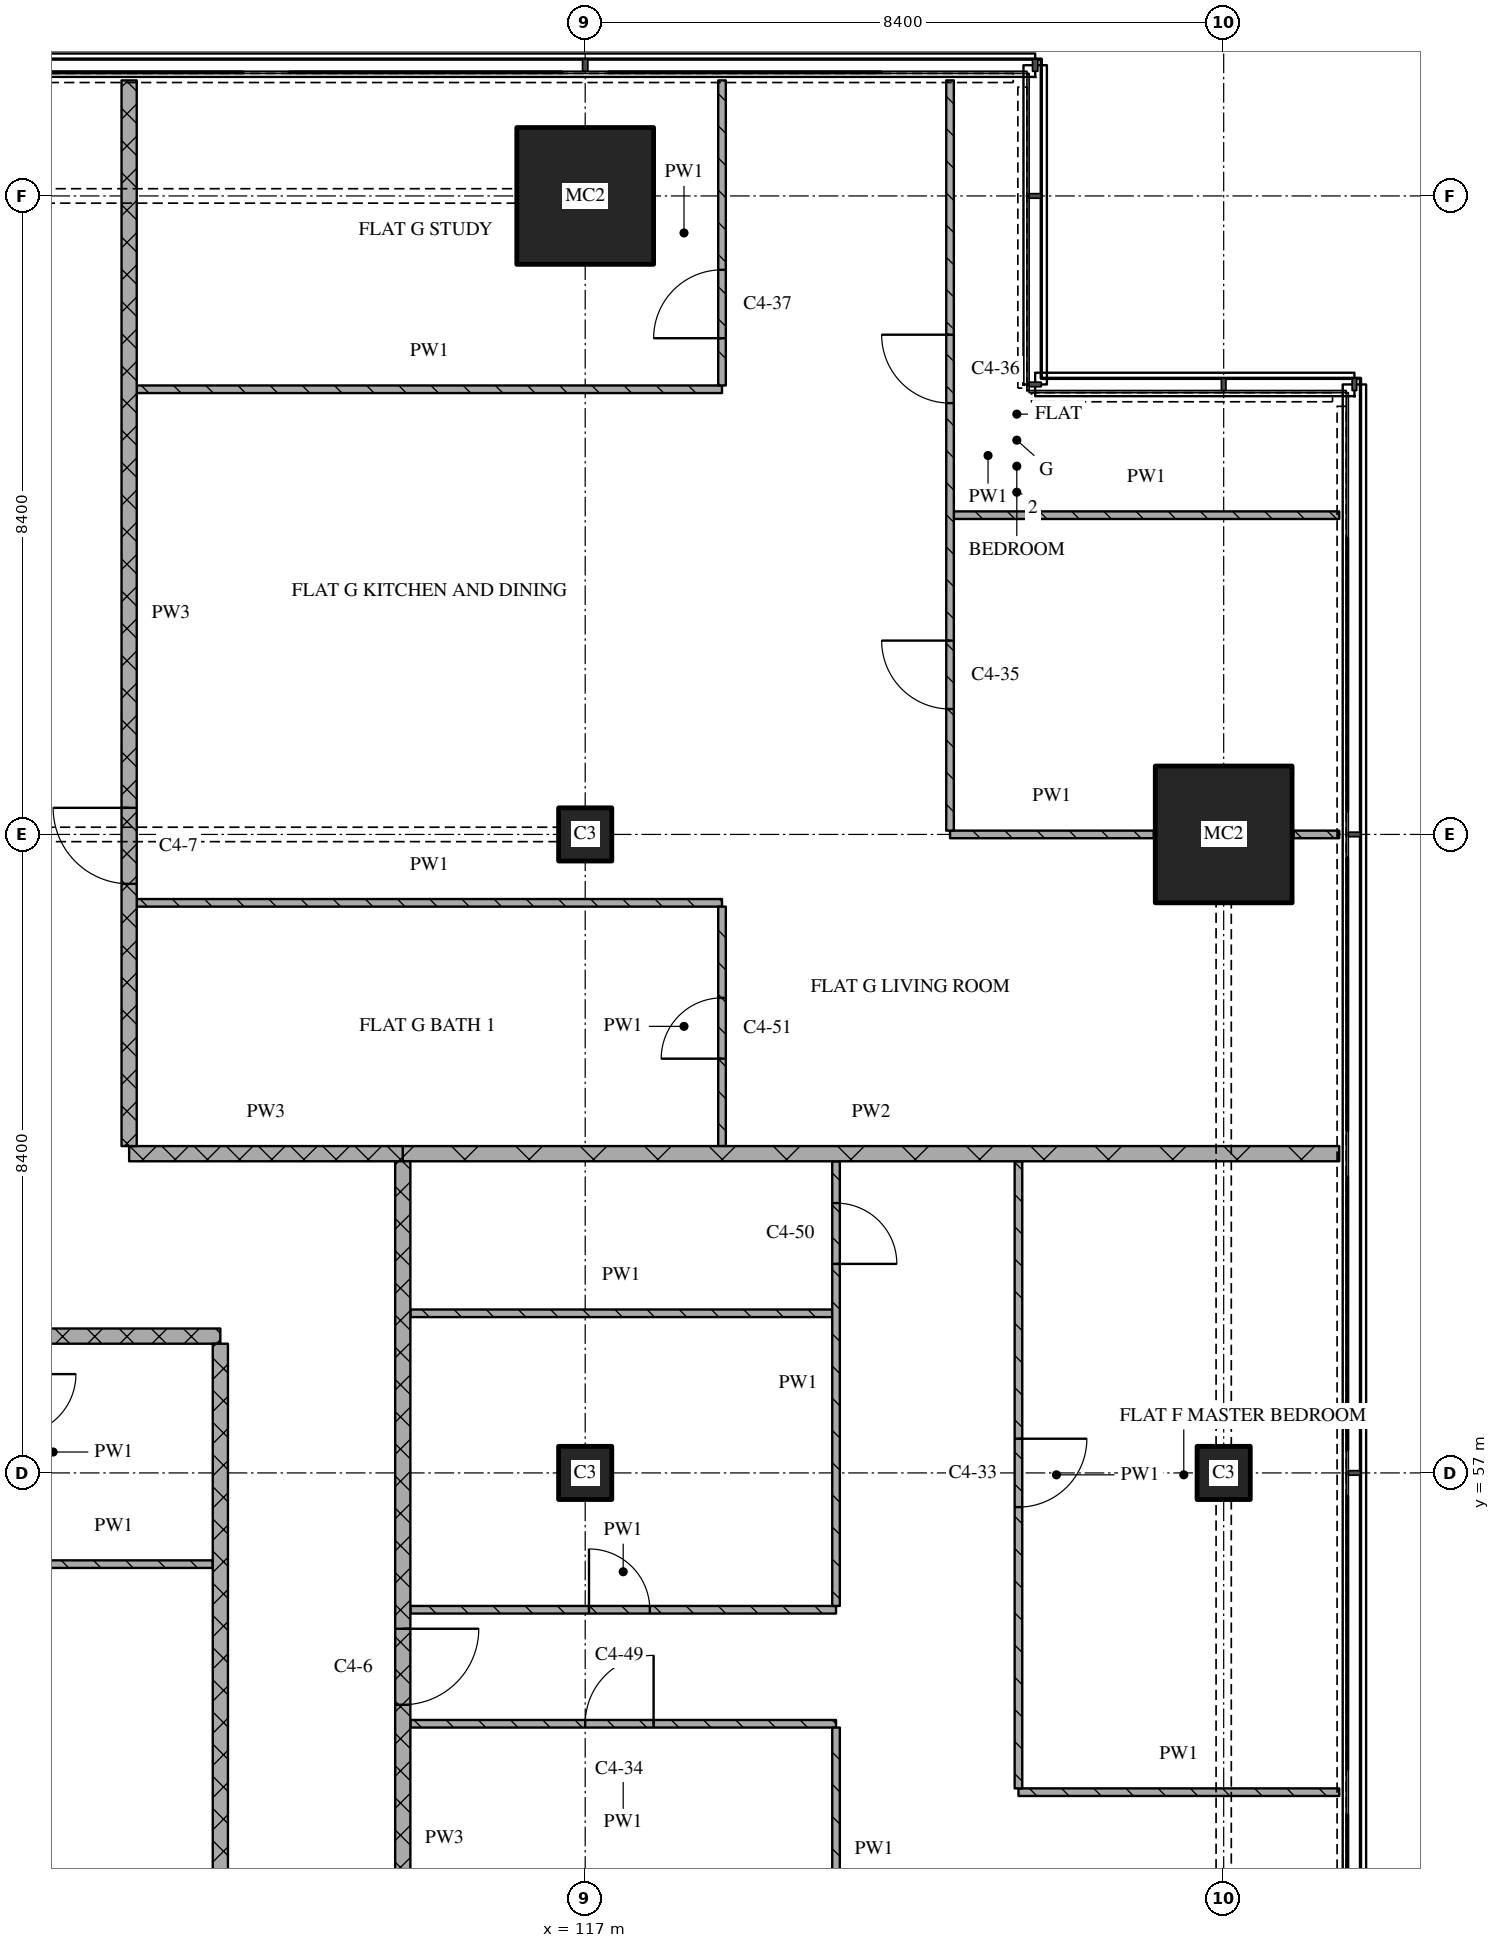
"""IFC4 building model, lengths in metres.
Left out: names, types, materials, properties, quantities, classifications, styles, units other than length and angle.
Written with IfcOpenShell. Run it as: python <this file> out.ifc"""

import sys

from ifc_helpers import new_model, si_unit, direction, frame, frame_2d, origin, origin_2d, place, context, subcontext, project, spatial, rectangle, extrude, element, fill, save


model = new_model("IFC4")
c1 = context("Model", 3, precision=1e-05, world=origin(), true_north=direction((0.0, 1.0)))
c2 = subcontext(c1, "Body", "Model", "MODEL_VIEW")
j1 = project(units=[si_unit("LENGTHUNIT", "METRE"), si_unit("PLANEANGLEUNIT", "RADIAN")], contexts=[c1])
p1 = place(None, origin())
s1 = spatial("IfcSite", under=j1, at=p1, CompositionType="ELEMENT")
p2 = place(p1, origin())
s2 = spatial("IfcBuilding", under=s1, at=p2, CompositionType="ELEMENT")
p3 = place(p2, frame((0.0, 0.0, 183.45)))
s3 = spatial("IfcBuildingStorey", under=s2, at=p3, CompositionType="ELEMENT", Elevation=183.45)
for number, where, z_axis, x_axis in (
    (1, (117.0, 57.0, 0.0), (0.0, 0.0, 1.0), (1.0, 0.0, 0.0)),
    (2, (117.0, 65.4, 0.0), (0.0, 0.0, 1.0), (1.0, 0.0, 0.0)),
):
    element("IfcColumn", number, at=place(p3, frame(where, z_axis=z_axis, x_axis=x_axis)), inside=s3, PredefinedType="COLUMN", context=c2, shape_type="SweptSolid", body=[
        extrude(rectangle(XDim=0.7, YDim=0.7, at=origin_2d()), origin(), (0.0, 0.0, 1.0), 3.6),
    ])
p4 = place(p3, frame((117.0, 73.8, 0.0), z_axis=(0.0, 0.0, 1.0), x_axis=(1.0, 0.0, 0.0)))
e3 = element("IfcColumn", 3, at=p4, inside=s3, PredefinedType="COLUMN", context=c2, shape_type="SweptSolid", body=[
    extrude(rectangle(XDim=1.8, YDim=1.8, at=origin_2d()), origin(), (0.0, 0.0, 1.0), 3.6),
])
p5 = place(p3, frame((125.4, 57.0, 0.0), z_axis=(0.0, 0.0, 1.0), x_axis=(1.0, 0.0, 0.0)))
e4 = element("IfcColumn", 4, at=p5, inside=s3, PredefinedType="COLUMN", context=c2, shape_type="SweptSolid", body=[
    extrude(rectangle(XDim=0.7, YDim=0.7, at=origin_2d()), origin(), (0.0, 0.0, 1.0), 3.6),
])
p6 = place(p3, frame((125.4, 65.4, 0.0), z_axis=(0.0, 0.0, 1.0), x_axis=(1.0, 0.0, 0.0)))
e5 = element("IfcColumn", 5, at=p6, inside=s3, PredefinedType="COLUMN", context=c2, shape_type="SweptSolid", body=[
    extrude(rectangle(XDim=1.8, YDim=1.8, at=origin_2d()), origin(), (0.0, 0.0, 1.0), 3.6),
])
p7 = place(p3, frame((122.7, 52.8, 0.0), z_axis=(0.0, 0.0, 1.0), x_axis=(1.0, 0.0, 0.0)))
e6 = element("IfcWall", 6, at=p7, inside=s3, PredefinedType="PARTITIONING", context=c2, shape_type="SweptSolid", body=[
    extrude(rectangle(XDim=4.22, YDim=0.1, at=frame_2d((2.11, 0.0))), origin(), (0.0, 0.0, 1.0), 3.32),
])
p8 = place(p3, frame((120.3, 53.7, 0.0), z_axis=(0.0, 0.0, 1.0), x_axis=(-1.0, 0.0, 0.0)))
e7 = element("IfcWall", 7, at=p8, inside=s3, PredefinedType="PARTITIONING", context=c2, shape_type="SweptSolid", body=[
    extrude(rectangle(XDim=5.6, YDim=0.1, at=frame_2d((2.8, 0.0))), origin(), (0.0, 0.0, 1.0), 3.32),
])
p9 = place(p8, frame((2.4, 0.0, 0.0)))
e8 = element("IfcOpeningElement", 8, at=p9, cuts=e7, PredefinedType="OPENING", context=c2, shape_type="SweptSolid", body=[
    extrude(rectangle(XDim=0.9, YDim=2.1, at=frame_2d((0.45, 1.05))), frame((0.0, 0.06, 0.0), z_axis=(0.0, -1.0, 0.0), x_axis=(1.0, 0.0, 0.0)), (0.0, 0.0, 1.0), 0.12),
])
p10 = place(p3, frame((114.7, 55.2, 0.0), z_axis=(0.0, 0.0, 1.0), x_axis=(1.0, 0.0, 0.0)))
e9 = element("IfcWall", 9, at=p10, inside=s3, PredefinedType="PARTITIONING", context=c2, shape_type="SweptSolid", body=[
    extrude(rectangle(XDim=5.6, YDim=0.1, at=frame_2d((2.8, 0.0))), origin(), (0.0, 0.0, 1.0), 3.32),
])
p11 = place(p10, frame((2.35, 0.0, 0.0)))
e10 = element("IfcOpeningElement", 10, at=p11, cuts=e9, PredefinedType="OPENING", context=c2, shape_type="SweptSolid", body=[
    extrude(rectangle(XDim=0.8, YDim=2.1, at=frame_2d((0.4, 1.05))), frame((0.0, 0.06, 0.0), z_axis=(0.0, -1.0, 0.0), x_axis=(1.0, 0.0, 0.0)), (0.0, 0.0, 1.0), 0.12),
])
p12 = place(p3, frame((109.5, 55.8, 0.0), z_axis=(0.0, 0.0, 1.0), x_axis=(1.0, 0.0, 0.0)))
e11 = element("IfcWall", 11, at=p12, inside=s3, PredefinedType="PARTITIONING", context=c2, shape_type="SweptSolid", body=[
    extrude(rectangle(XDim=2.6, YDim=0.1, at=frame_2d((1.3, 0.0))), origin(), (0.0, 0.0, 1.0), 3.32),
])
p13 = place(p3, frame((112.2, 58.8, 0.0), z_axis=(0.0, 0.0, 1.0), x_axis=(-1.0, 0.0, 0.0)))
e12 = element("IfcWall", 12, at=p13, inside=s3, PredefinedType="PARTITIONING", context=c2, shape_type="SweptSolid", body=[
    extrude(rectangle(XDim=10.8, YDim=0.2, at=frame_2d((5.4, 0.0))), origin(), (0.0, 0.0, 1.0), 3.32),
])
p14 = place(p13, frame((2.85, 0.0, 0.0)))
e13 = element("IfcOpeningElement", 13, at=p14, cuts=e12, PredefinedType="OPENING", context=c2, shape_type="SweptSolid", body=[
    extrude(rectangle(XDim=1.0, YDim=2.1, at=frame_2d((0.5, 1.05))), frame((0.0, 0.11, 0.0), z_axis=(0.0, -1.0, 0.0), x_axis=(1.0, 0.0, 0.0)), (0.0, 0.0, 1.0), 0.22),
])
p15 = place(p3, frame((114.7, 59.1, 0.0), z_axis=(0.0, 0.0, 1.0), x_axis=(1.0, 0.0, 0.0)))
e14 = element("IfcWall", 14, at=p15, inside=s3, PredefinedType="PARTITIONING", context=c2, shape_type="SweptSolid", body=[
    extrude(rectangle(XDim=5.55, YDim=0.1, at=frame_2d((2.775, 0.0))), origin(), (0.0, 0.0, 1.0), 3.32),
])
p16 = place(p3, frame((111.0, 61.2, 0.0), z_axis=(0.0, 0.0, 1.0), x_axis=(1.0, 0.0, 0.0)))
e15 = element("IfcWall", 15, at=p16, inside=s3, PredefinedType="PARTITIONING", context=c2, shape_type="SweptSolid", body=[
    extrude(rectangle(XDim=3.6, YDim=0.2, at=frame_2d((1.8, 0.0))), origin(), (0.0, 0.0, 1.0), 3.32),
])
p17 = place(p3, frame((114.6, 61.2, 0.0), z_axis=(0.0, 0.0, 1.0), x_axis=(1.0, 0.0, 0.0)))
e16 = element("IfcWall", 16, at=p17, inside=s3, PredefinedType="PARTITIONING", context=c2, shape_type="SweptSolid", body=[
    extrude(rectangle(XDim=12.32, YDim=0.2, at=frame_2d((6.16, 0.0))), origin(), (0.0, 0.0, 1.0), 3.32),
])
p18 = place(p3, frame((111.1, 64.5, 0.0), z_axis=(0.0, 0.0, 1.0), x_axis=(1.0, 0.0, 0.0)))
e17 = element("IfcWall", 17, at=p18, inside=s3, PredefinedType="PARTITIONING", context=c2, shape_type="SweptSolid", body=[
    extrude(rectangle(XDim=7.7, YDim=0.1, at=frame_2d((3.85, 0.0))), origin(), (0.0, 0.0, 1.0), 3.32),
])
p19 = place(p3, frame((121.8, 65.4, 0.0), z_axis=(0.0, 0.0, 1.0), x_axis=(1.0, 0.0, 0.0)))
e18 = element("IfcWall", 18, at=p19, inside=s3, PredefinedType="PARTITIONING", context=c2, shape_type="SweptSolid", body=[
    extrude(rectangle(XDim=2.68, YDim=0.1, at=frame_2d((1.34, 0.0))), origin(), (0.0, 0.0, 1.0), 3.32),
])
p20 = place(p3, frame((126.32, 65.4, 0.0), z_axis=(0.0, 0.0, 1.0), x_axis=(1.0, 0.0, 0.0)))
e19 = element("IfcWall", 19, at=p20, inside=s3, PredefinedType="PARTITIONING", context=c2, shape_type="SweptSolid", body=[
    extrude(rectangle(XDim=0.6, YDim=0.1, at=frame_2d((0.3, 0.0))), origin(), (0.0, 0.0, 1.0), 3.32),
])
p21 = place(p3, frame((121.85, 69.6, 0.0), z_axis=(0.0, 0.0, 1.0), x_axis=(1.0, 0.0, 0.0)))
e20 = element("IfcWall", 20, at=p21, inside=s3, PredefinedType="PARTITIONING", context=c2, shape_type="SweptSolid", body=[
    extrude(rectangle(XDim=5.07, YDim=0.1, at=frame_2d((2.535, 0.0))), origin(), (0.0, 0.0, 1.0), 3.32),
])
p22 = place(p3, frame((111.1, 71.256, 0.0), z_axis=(0.0, 0.0, 1.0), x_axis=(1.0, 0.0, 0.0)))
e21 = element("IfcWall", 21, at=p22, inside=s3, PredefinedType="PARTITIONING", context=c2, shape_type="SweptSolid", body=[
    extrude(rectangle(XDim=7.7, YDim=0.1, at=frame_2d((3.85, 0.0))), origin(), (0.0, 0.0, 1.0), 3.32),
])
p23 = place(p3, frame((111.0, 75.32, 0.0), z_axis=(0.0, 0.0, 1.0), x_axis=(0.0, -1.0, 0.0)))
e22 = element("IfcWall", 22, at=p23, inside=s3, PredefinedType="PARTITIONING", context=c2, shape_type="SweptSolid", body=[
    extrude(rectangle(XDim=14.02, YDim=0.2, at=frame_2d((7.01, 0.0))), origin(), (0.0, 0.0, 1.0), 3.32),
])
p24 = place(p23, frame((9.57, 0.0, 0.0)))
e23 = element("IfcOpeningElement", 23, at=p24, cuts=e22, PredefinedType="OPENING", context=c2, shape_type="SweptSolid", body=[
    extrude(rectangle(XDim=1.0, YDim=2.1, at=frame_2d((0.5, 1.05))), frame((0.0, 0.11, 0.0), z_axis=(0.0, -1.0, 0.0), x_axis=(1.0, 0.0, 0.0)), (0.0, 0.0, 1.0), 0.22),
])
p25 = place(p3, frame((112.2, 58.7, 0.0), z_axis=(0.0, 0.0, 1.0), x_axis=(0.0, -1.0, 0.0)))
e24 = element("IfcWall", 24, at=p25, inside=s3, PredefinedType="PARTITIONING", context=c2, shape_type="SweptSolid", body=[
    extrude(rectangle(XDim=15.4, YDim=0.2, at=frame_2d((7.7, 0.0))), origin(), (0.0, 0.0, 1.0), 3.32),
])
p26 = place(p3, frame((114.6, 61.1, 0.0), z_axis=(0.0, 0.0, 1.0), x_axis=(0.0, -1.0, 0.0)))
e25 = element("IfcWall", 25, at=p26, inside=s3, PredefinedType="PARTITIONING", context=c2, shape_type="SweptSolid", body=[
    extrude(rectangle(XDim=17.8, YDim=0.2, at=frame_2d((8.9, 0.0))), origin(), (0.0, 0.0, 1.0), 3.32),
])
p27 = place(p26, frame((6.15, 0.0, 0.0)))
e26 = element("IfcOpeningElement", 26, at=p27, cuts=e25, PredefinedType="OPENING", context=c2, shape_type="SweptSolid", body=[
    extrude(rectangle(XDim=1.0, YDim=2.1, at=frame_2d((0.5, 1.05))), frame((0.0, 0.11, 0.0), z_axis=(0.0, -1.0, 0.0), x_axis=(1.0, 0.0, 0.0)), (0.0, 0.0, 1.0), 0.22),
])
p28 = place(p3, frame((118.8, 61.3, 0.0), z_axis=(0.0, 0.0, 1.0), x_axis=(0.0, 1.0, 0.0)))
e27 = element("IfcWall", 27, at=p28, inside=s3, PredefinedType="PARTITIONING", context=c2, shape_type="SweptSolid", body=[
    extrude(rectangle(XDim=3.15, YDim=0.1, at=frame_2d((1.575, 0.0))), origin(), (0.0, 0.0, 1.0), 3.32),
])
p29 = place(p28, frame((1.15, 0.0, 0.0)))
e28 = element("IfcOpeningElement", 28, at=p29, cuts=e27, PredefinedType="OPENING", context=c2, shape_type="SweptSolid", body=[
    extrude(rectangle(XDim=0.8, YDim=2.1, at=frame_2d((0.4, 1.05))), frame((0.0, 0.06, 0.0), z_axis=(0.0, -1.0, 0.0), x_axis=(1.0, 0.0, 0.0)), (0.0, 0.0, 1.0), 0.12),
])
p30 = place(p3, frame((118.8, 71.306, 0.0), z_axis=(0.0, 0.0, 1.0), x_axis=(0.0, 1.0, 0.0)))
e29 = element("IfcWall", 29, at=p30, inside=s3, PredefinedType="PARTITIONING", context=c2, shape_type="SweptSolid", body=[
    extrude(rectangle(XDim=4.014, YDim=0.1, at=frame_2d((2.007, 0.0))), origin(), (0.0, 0.0, 1.0), 3.32),
])
p31 = place(p30, frame((0.622, 0.0, 0.0)))
e30 = element("IfcOpeningElement", 30, at=p31, cuts=e29, PredefinedType="OPENING", context=c2, shape_type="SweptSolid", body=[
    extrude(rectangle(XDim=0.9, YDim=2.1, at=frame_2d((0.45, 1.05))), frame((0.0, 0.06, 0.0), z_axis=(0.0, -1.0, 0.0), x_axis=(1.0, 0.0, 0.0)), (0.0, 0.0, 1.0), 0.12),
])
p32 = place(p3, frame((120.3, 53.65, 0.0), z_axis=(0.0, 0.0, 1.0), x_axis=(0.0, -1.0, 0.0)))
e31 = element("IfcWall", 31, at=p32, inside=s3, PredefinedType="PARTITIONING", context=c2, shape_type="SweptSolid", body=[
    extrude(rectangle(XDim=3.207, YDim=0.1, at=frame_2d((1.604, 0.0))), origin(), (0.0, 0.0, 1.0), 3.32),
])
p33 = place(p3, frame((120.3, 55.25, 0.0), z_axis=(0.0, 0.0, 1.0), x_axis=(0.0, 1.0, 0.0)))
e32 = element("IfcWall", 32, at=p33, inside=s3, PredefinedType="PARTITIONING", context=c2, shape_type="SweptSolid", body=[
    extrude(rectangle(XDim=5.85, YDim=0.1, at=frame_2d((2.925, 0.0))), origin(), (0.0, 0.0, 1.0), 3.32),
])
p34 = place(p33, frame((4.5, 0.0, 0.0)))
e33 = element("IfcOpeningElement", 33, at=p34, cuts=e32, PredefinedType="OPENING", context=c2, shape_type="SweptSolid", body=[
    extrude(rectangle(XDim=0.8, YDim=2.1, at=frame_2d((0.4, 1.05))), frame((0.0, 0.06, 0.0), z_axis=(0.0, -1.0, 0.0), x_axis=(1.0, 0.0, 0.0)), (0.0, 0.0, 1.0), 0.12),
])
p35 = place(p3, frame((121.8, 75.32, 0.0), z_axis=(0.0, 0.0, 1.0), x_axis=(0.0, -1.0, 0.0)))
e34 = element("IfcWall", 34, at=p35, inside=s3, PredefinedType="PARTITIONING", context=c2, shape_type="SweptSolid", body=[
    extrude(rectangle(XDim=9.87, YDim=0.1, at=frame_2d((4.935, 0.0))), origin(), (0.0, 0.0, 1.0), 3.32),
])
p36 = place(p35, frame((3.346, 0.0, 0.0)))
e35 = element("IfcOpeningElement", 35, at=p36, cuts=e34, PredefinedType="OPENING", context=c2, shape_type="SweptSolid", body=[
    extrude(rectangle(XDim=0.9, YDim=2.1, at=frame_2d((0.45, 1.05))), frame((0.0, 0.06, 0.0), z_axis=(0.0, -1.0, 0.0), x_axis=(1.0, 0.0, 0.0)), (0.0, 0.0, 1.0), 0.12),
])
p37 = place(p35, frame((7.37, 0.0, 0.0)))
e36 = element("IfcOpeningElement", 36, at=p37, cuts=e34, PredefinedType="OPENING", context=c2, shape_type="SweptSolid", body=[
    extrude(rectangle(XDim=0.9, YDim=2.1, at=frame_2d((0.45, 1.05))), frame((0.0, 0.06, 0.0), z_axis=(0.0, -1.0, 0.0), x_axis=(1.0, 0.0, 0.0)), (0.0, 0.0, 1.0), 0.12),
])
p38 = place(p3, frame((122.7, 61.1, 0.0), z_axis=(0.0, 0.0, 1.0), x_axis=(0.0, -1.0, 0.0)))
e37 = element("IfcWall", 37, at=p38, inside=s3, PredefinedType="PARTITIONING", context=c2, shape_type="SweptSolid", body=[
    extrude(rectangle(XDim=8.25, YDim=0.1, at=frame_2d((4.125, 0.0))), origin(), (0.0, 0.0, 1.0), 3.32),
])
p39 = place(p38, frame((3.65, 0.0, 0.0)))
e38 = element("IfcOpeningElement", 38, at=p39, cuts=e37, PredefinedType="OPENING", context=c2, shape_type="SweptSolid", body=[
    extrude(rectangle(XDim=0.9, YDim=2.1, at=frame_2d((0.45, 1.05))), frame((0.0, 0.06, 0.0), z_axis=(0.0, -1.0, 0.0), x_axis=(1.0, 0.0, 0.0)), (0.0, 0.0, 1.0), 0.12),
])
p40 = place(p9, origin())
e39 = element("IfcDoor", 39, at=p40, inside=s3, OperationType="SINGLE_SWING_RIGHT", PredefinedType="DOOR", context=c2, shape_type="SweptSolid", body=[
    extrude(rectangle(XDim=0.9, YDim=2.1, at=frame_2d((0.45, 1.05))), frame((0.0, 0.025, 0.0), z_axis=(0.0, -1.0, 0.0), x_axis=(1.0, 0.0, 0.0)), (0.0, 0.0, 1.0), 0.05),
])
fill(e8, e39)
p41 = place(p11, origin())
e40 = element("IfcDoor", 40, at=p41, inside=s3, OperationType="SINGLE_SWING_LEFT", PredefinedType="DOOR", context=c2, shape_type="SweptSolid", body=[
    extrude(rectangle(XDim=0.8, YDim=2.1, at=frame_2d((0.4, 1.05))), frame((0.0, 0.025, 0.0), z_axis=(0.0, -1.0, 0.0), x_axis=(1.0, 0.0, 0.0)), (0.0, 0.0, 1.0), 0.05),
])
fill(e10, e40)
p42 = place(p24, origin())
e41 = element("IfcDoor", 41, at=p42, inside=s3, OperationType="SINGLE_SWING_RIGHT", PredefinedType="DOOR", context=c2, shape_type="SweptSolid", body=[
    extrude(rectangle(XDim=1.0, YDim=2.1, at=frame_2d((0.5, 1.05))), frame((0.0, 0.025, 0.0), z_axis=(0.0, -1.0, 0.0), x_axis=(1.0, 0.0, 0.0)), (0.0, 0.0, 1.0), 0.05),
])
fill(e23, e41)
p43 = place(p27, origin())
e42 = element("IfcDoor", 42, at=p43, inside=s3, OperationType="SINGLE_SWING_LEFT", PredefinedType="DOOR", context=c2, shape_type="SweptSolid", body=[
    extrude(rectangle(XDim=1.0, YDim=2.1, at=frame_2d((0.5, 1.05))), frame((0.0, 0.025, 0.0), z_axis=(0.0, -1.0, 0.0), x_axis=(1.0, 0.0, 0.0)), (0.0, 0.0, 1.0), 0.05),
])
fill(e26, e42)
p44 = place(p29, origin())
e43 = element("IfcDoor", 43, at=p44, inside=s3, OperationType="SINGLE_SWING_LEFT", PredefinedType="DOOR", context=c2, shape_type="SweptSolid", body=[
    extrude(rectangle(XDim=0.8, YDim=2.1, at=frame_2d((0.4, 1.05))), frame((0.0, 0.025, 0.0), z_axis=(0.0, -1.0, 0.0), x_axis=(1.0, 0.0, 0.0)), (0.0, 0.0, 1.0), 0.05),
])
fill(e28, e43)
p45 = place(p31, origin())
e44 = element("IfcDoor", 44, at=p45, inside=s3, OperationType="SINGLE_SWING_LEFT", PredefinedType="DOOR", context=c2, shape_type="SweptSolid", body=[
    extrude(rectangle(XDim=0.9, YDim=2.1, at=frame_2d((0.45, 1.05))), frame((0.0, 0.025, 0.0), z_axis=(0.0, -1.0, 0.0), x_axis=(1.0, 0.0, 0.0)), (0.0, 0.0, 1.0), 0.05),
])
fill(e30, e44)
p46 = place(p34, origin())
e45 = element("IfcDoor", 45, at=p46, inside=s3, OperationType="SINGLE_SWING_RIGHT", PredefinedType="DOOR", context=c2, shape_type="SweptSolid", body=[
    extrude(rectangle(XDim=0.8, YDim=2.1, at=frame_2d((0.4, 1.05))), frame((0.0, 0.025, 0.0), z_axis=(0.0, -1.0, 0.0), x_axis=(1.0, 0.0, 0.0)), (0.0, 0.0, 1.0), 0.05),
])
fill(e33, e45)
p47 = place(p36, origin())
e46 = element("IfcDoor", 46, at=p47, inside=s3, OperationType="SINGLE_SWING_RIGHT", PredefinedType="DOOR", context=c2, shape_type="SweptSolid", body=[
    extrude(rectangle(XDim=0.9, YDim=2.1, at=frame_2d((0.45, 1.05))), frame((0.0, 0.025, 0.0), z_axis=(0.0, -1.0, 0.0), x_axis=(1.0, 0.0, 0.0)), (0.0, 0.0, 1.0), 0.05),
])
fill(e35, e46)
p48 = place(p37, origin())
e47 = element("IfcDoor", 47, at=p48, inside=s3, OperationType="SINGLE_SWING_RIGHT", PredefinedType="DOOR", context=c2, shape_type="SweptSolid", body=[
    extrude(rectangle(XDim=0.9, YDim=2.1, at=frame_2d((0.45, 1.05))), frame((0.0, 0.025, 0.0), z_axis=(0.0, -1.0, 0.0), x_axis=(1.0, 0.0, 0.0)), (0.0, 0.0, 1.0), 0.05),
])
fill(e36, e47)
p49 = place(p39, origin())
e48 = element("IfcDoor", 48, at=p49, inside=s3, OperationType="SINGLE_SWING_LEFT", PredefinedType="DOOR", context=c2, shape_type="SweptSolid", body=[
    extrude(rectangle(XDim=0.9, YDim=2.1, at=frame_2d((0.45, 1.05))), frame((0.0, 0.025, 0.0), z_axis=(0.0, -1.0, 0.0), x_axis=(1.0, 0.0, 0.0)), (0.0, 0.0, 1.0), 0.05),
])
fill(e38, e48)
save(model, sys.argv[1])
